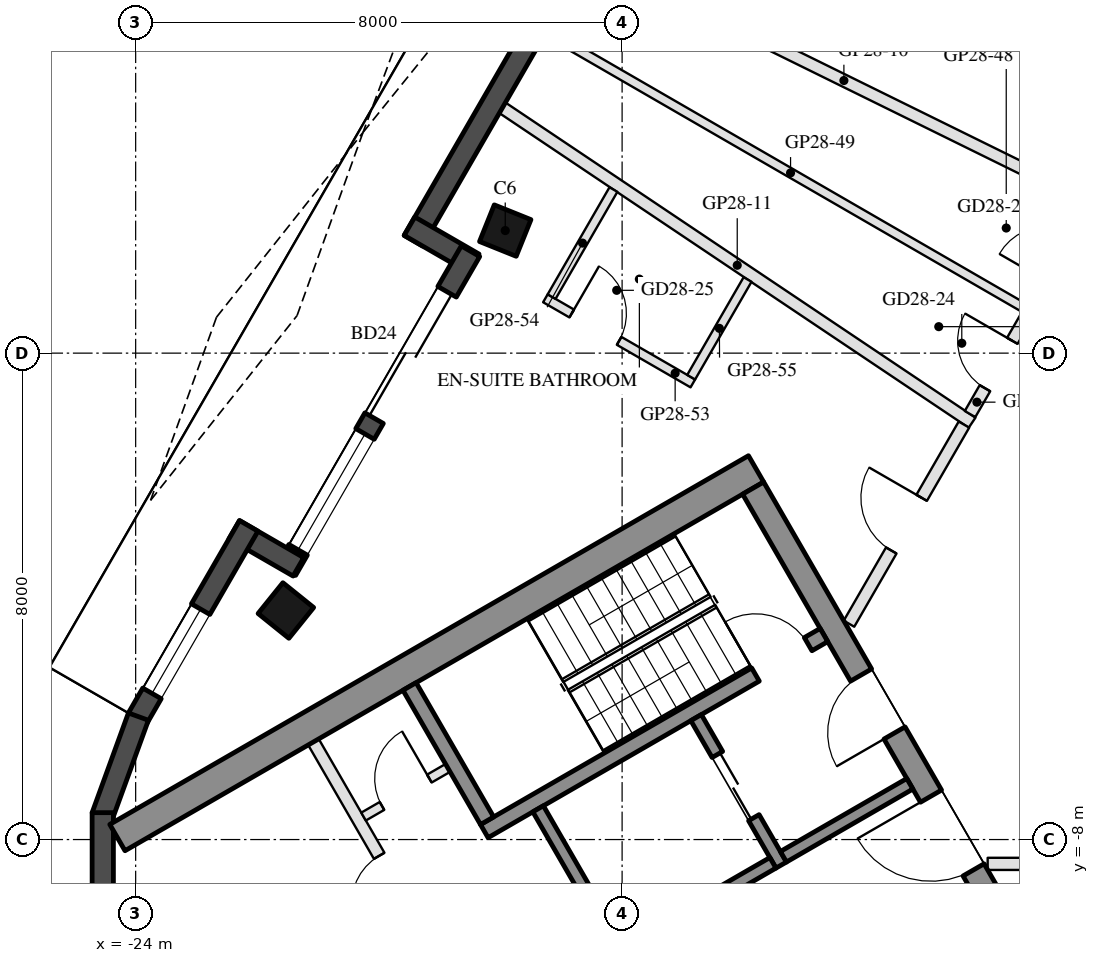
"""IFC4 building model, lengths in metres.
Left out: names, types, materials, properties, quantities, classifications, styles, units other than length and angle.
Written with IfcOpenShell. Run it as: python <this file> out.ifc"""

import sys

from ifc_helpers import new_model, si_unit, direction, frame, frame_2d, origin, origin_2d, place, context, subcontext, project, spatial, rectangle, hollow_rectangle, extrude, boolean, halfspace, element, fill, save


model = new_model("IFC4")
c1 = context("Model", 3, precision=1e-05, world=origin(), true_north=direction((0.0, 1.0)))
c2 = subcontext(c1, "Body", "Model", "MODEL_VIEW")
j1 = project(units=[si_unit("LENGTHUNIT", "METRE"), si_unit("PLANEANGLEUNIT", "RADIAN")], contexts=[c1])
p1 = place(None, origin())
s1 = spatial("IfcSite", under=j1, at=p1, CompositionType="ELEMENT")
p2 = place(p1, origin())
s2 = spatial("IfcBuilding", under=s1, at=p2, CompositionType="ELEMENT")
p3 = place(p2, frame((0.0, 0.0, 287.4)))
s3 = spatial("IfcBuildingStorey", under=s2, at=p3, CompositionType="ELEMENT", Elevation=287.4)
p4 = place(p3, frame((-17.922, 2.016, 0.0), z_axis=(0.161441555696, -0.022914285325, 0.986616216987), x_axis=(-0.49507293815, -0.866715878813, 0.060879974747)))
e1 = element("IfcColumn", 1, at=p4, inside=s3, PredefinedType="COLUMN", context=c2, shape_type="SweptSolid", body=[
    boolean("DIFFERENCE", boolean("DIFFERENCE", extrude(hollow_rectangle(XDim=0.65, YDim=0.65, WallThickness=0.03, at=origin_2d()), origin(), (0.0, 0.0, 1.0), 3.75), halfspace(frame((0.0, 0.0, 0.04), z_axis=(0.0, 0.0, 1.0), x_axis=(1.0, 0.0, 0.0)), True)), halfspace(frame((0.0, 0.0, 3.711), z_axis=(0.0, 0.0, 1.0), x_axis=(1.0, 0.0, 0.0)), False)),
])
p5 = place(p3, frame((-21.53, -4.233, 0.0), z_axis=(0.190723355538, 0.02965081359, 0.981195918716), x_axis=(-0.48832184533, -0.864229250401, 0.121035441609)))
e2 = element("IfcColumn", 2, at=p5, inside=s3, PredefinedType="COLUMN", context=c2, shape_type="SweptSolid", body=[
    boolean("DIFFERENCE", boolean("DIFFERENCE", extrude(hollow_rectangle(XDim=0.65, YDim=0.65, WallThickness=0.03, at=origin_2d()), origin(), (0.0, 0.0, 1.0), 3.771), halfspace(frame((0.0, 0.0, 0.047), z_axis=(0.0, 0.0, 1.0), x_axis=(1.0, 0.0, 0.0)), True)), halfspace(frame((0.0, 0.0, 3.724), z_axis=(0.0, 0.0, 1.0), x_axis=(1.0, 0.0, 0.0)), False)),
])
p6 = place(p3, frame((-14.925, 9.656, 0.0), z_axis=(0.0, 0.0, 1.0), x_axis=(-0.500018599098, -0.866014665324, 0.0)))
e3 = element("IfcWall", 3, at=p6, inside=s3, PredefinedType="SOLIDWALL", context=c2, shape_type="SweptSolid", body=[
    extrude(rectangle(XDim=9.015, YDim=0.35, at=frame_2d((4.508, 0.0))), origin(), (0.0, 0.0, 1.0), 3.55),
])
p7 = place(p6, frame((1.614, 0.0, 0.0)))
e4 = element("IfcOpeningElement", 4, at=p7, cuts=e3, PredefinedType="OPENING", context=c2, shape_type="SweptSolid", body=[
    extrude(rectangle(XDim=1.4, YDim=2.4, at=frame_2d((0.7, 1.2))), frame((0.0, 0.185, 0.0), z_axis=(0.0, -1.0, 0.0), x_axis=(1.0, 0.0, 0.0)), (0.0, 0.0, 1.0), 0.37),
])
p8 = place(p3, frame((-19.497, 2.088, 0.0), z_axis=(0.0, 0.0, 1.0), x_axis=(0.866005645448, -0.500034220881, 0.0)))
e5 = element("IfcWall", 5, at=p8, inside=s3, PredefinedType="SOLIDWALL", context=c2, shape_type="SweptSolid", body=[
    extrude(rectangle(XDim=1.22, YDim=0.35, at=frame_2d((0.61, 0.0))), origin(), (0.0, 0.0, 1.0), 3.55),
])
p9 = place(p3, frame((-18.493, 1.676, 0.0), z_axis=(0.0, 0.0, 1.0), x_axis=(-0.499985371027, -0.866033849661, 0.0)))
e6 = element("IfcWall", 6, at=p9, inside=s3, PredefinedType="SOLIDWALL", context=c2, shape_type="SweptSolid", body=[
    extrude(rectangle(XDim=6.055, YDim=0.35, at=frame_2d((3.028, 0.0))), origin(), (0.0, 0.0, 1.0), 3.55),
])
p10 = place(p9, frame((0.77, 0.0, 0.0)))
e7 = element("IfcOpeningElement", 7, at=p10, cuts=e6, PredefinedType="OPENING", context=c2, shape_type="SweptSolid", body=[
    extrude(rectangle(XDim=2.4, YDim=2.4, at=frame_2d((1.2, 1.2))), frame((0.0, 0.185, 0.0), z_axis=(0.0, -1.0, 0.0), x_axis=(1.0, 0.0, 0.0)), (0.0, 0.0, 1.0), 0.37),
])
p11 = place(p9, frame((3.47, 0.0, 0.3)))
e8 = element("IfcOpeningElement", 8, at=p11, cuts=e6, PredefinedType="OPENING", context=c2, shape_type="SweptSolid", body=[
    extrude(rectangle(XDim=2.2, YDim=2.65, at=frame_2d((1.1, 1.325))), frame((0.0, 0.185, 0.0), z_axis=(0.0, -1.0, 0.0), x_axis=(1.0, 0.0, 0.0)), (0.0, 0.0, 1.0), 0.37),
])
p12 = place(p3, frame((-21.323, -3.515, 0.0), z_axis=(0.0, 0.0, 1.0), x_axis=(-0.866092288191, 0.499884134912, 0.0)))
e9 = element("IfcWall", 9, at=p12, inside=s3, PredefinedType="SOLIDWALL", context=c2, shape_type="SweptSolid", body=[
    extrude(rectangle(XDim=1.22, YDim=0.35, at=frame_2d((0.61, 0.0))), origin(), (0.0, 0.0, 1.0), 3.55),
])
p13 = place(p3, frame((-22.14, -2.841, 0.0), z_axis=(0.0, 0.0, 1.0), x_axis=(-0.500040506767, -0.866002015928, 0.0)))
e10 = element("IfcWall", 10, at=p13, inside=s3, PredefinedType="SOLIDWALL", context=c2, shape_type="SweptSolid", body=[
    extrude(rectangle(XDim=3.655, YDim=0.35, at=frame_2d((1.827, 0.0))), origin(), (0.0, 0.0, 1.0), 3.55),
])
p14 = place(p13, frame((1.582, 0.0, 0.3)))
e11 = element("IfcOpeningElement", 11, at=p14, cuts=e10, PredefinedType="OPENING", context=c2, shape_type="SweptSolid", body=[
    extrude(rectangle(XDim=1.6, YDim=2.65, at=frame_2d((0.8, 1.325))), frame((0.0, 0.185, 0.0), z_axis=(0.0, -1.0, 0.0), x_axis=(1.0, 0.0, 0.0)), (0.0, 0.0, 1.0), 0.37),
])
for number, where, z_axis, x_axis in (
    (12, (-23.955, -5.978, 0.0), (0.0, 0.0, 1.0), (-0.342, -0.94, 0.0)),
    (13, (-24.541, -7.558, 0.0), (0.0, 0.0, 1.0), (0.0, -1.0, 0.0)),
):
    element("IfcWall", number, at=place(p3, frame(where, z_axis=z_axis, x_axis=x_axis)), inside=s3, PredefinedType="SOLIDWALL", context=c2, shape_type="SweptSolid", body=[
        extrude(rectangle(XDim=1.745, YDim=0.35, at=frame_2d((0.872, 0.0))), origin(), (0.0, 0.0, 1.0), 3.55),
    ])
p15 = place(p3, frame((-13.797, -1.903, 0.0), z_axis=(0.0, 0.0, 1.0), x_axis=(-0.866024688907, -0.500001238203, 0.0)))
e14 = element("IfcWall", 14, at=p15, inside=s3, PredefinedType="SHEAR", context=c2, shape_type="SweptSolid", body=[
    extrude(rectangle(XDim=12.129, YDim=0.5, at=frame_2d((6.064, 0.0))), origin(), (0.0, 0.0, 1.0), 3.5),
])
p16 = place(p3, frame((-13.845, -2.22, 0.0), z_axis=(0.0, 0.0, 1.0), x_axis=(0.500004234368, -0.866022959057, 0.0)))
e15 = element("IfcWall", 15, at=p16, inside=s3, PredefinedType="SHEAR", context=c2, shape_type="SweptSolid", body=[
    extrude(rectangle(XDim=10.0, YDim=0.4, at=frame_2d((5.0, 0.0))), origin(), (0.0, 0.0, 1.0), 3.5),
])
p17 = place(p16, frame((3.55, 0.0, 0.0)))
e16 = element("IfcOpeningElement", 16, at=p17, cuts=e15, PredefinedType="OPENING", context=c2, shape_type="SweptSolid", body=[
    extrude(rectangle(XDim=1.1, YDim=2.1, at=frame_2d((0.55, 1.05))), frame((0.0, 0.21, 0.0), z_axis=(0.0, -1.0, 0.0), x_axis=(1.0, 0.0, 0.0)), (0.0, 0.0, 1.0), 0.42),
])
p18 = place(p16, frame((5.85, 0.0, 0.0)))
e17 = element("IfcOpeningElement", 17, at=p18, cuts=e15, PredefinedType="OPENING", context=c2, shape_type="SweptSolid", body=[
    extrude(rectangle(XDim=1.4, YDim=2.1, at=frame_2d((0.7, 1.05))), frame((0.0, 0.21, 0.0), z_axis=(0.0, -1.0, 0.0), x_axis=(1.0, 0.0, 0.0)), (0.0, 0.0, 1.0), 0.42),
])
p19 = place(p3, frame((-12.681, -4.636, 0.0), z_axis=(0.0, 0.0, 1.0), x_axis=(-0.866021702275, -0.500006411147, 0.0)))
e18 = element("IfcWall", 18, at=p19, inside=s3, PredefinedType="SHEAR", context=c2, shape_type="SweptSolid", body=[
    extrude(rectangle(XDim=6.45, YDim=0.25, at=frame_2d((3.225, 0.0))), origin(), (0.0, 0.0, 1.0), 3.5),
])
p20 = place(p19, frame((0.3, 0.0, 0.0)))
e19 = element("IfcOpeningElement", 19, at=p20, cuts=e18, PredefinedType="OPENING", context=c2, shape_type="SweptSolid", body=[
    extrude(rectangle(XDim=1.0, YDim=2.1, at=frame_2d((0.5, 1.05))), frame((0.0, 0.135, 0.0), z_axis=(0.0, -1.0, 0.0), x_axis=(1.0, 0.0, 0.0)), (0.0, 0.0, 1.0), 0.27),
])
p21 = place(p3, frame((-19.496, -5.482, 0.0), z_axis=(0.0, 0.0, 1.0), x_axis=(0.499990435942, -0.866030925526, 0.0)))
e20 = element("IfcWall", 20, at=p21, inside=s3, PredefinedType="SHEAR", context=c2, shape_type="SweptSolid", body=[
    extrude(rectangle(XDim=2.55, YDim=0.25, at=frame_2d((1.275, 0.0))), origin(), (0.0, 0.0, 1.0), 3.5),
])
p22 = place(p3, frame((-17.381, -7.495, 0.0), z_axis=(0.0, 0.0, 1.0), x_axis=(0.500011755427, -0.866018616679, 0.0)))
e21 = element("IfcWall", 21, at=p22, inside=s3, PredefinedType="SHEAR", context=c2, shape_type="SweptSolid", body=[
    extrude(rectangle(XDim=2.8, YDim=0.2, at=frame_2d((1.4, 0.0))), origin(), (0.0, 0.0, 1.0), 3.5),
])
p23 = place(p3, frame((-14.783, -5.995, 0.0), z_axis=(0.0, 0.0, 1.0), x_axis=(0.49994636267, -0.866056369097, 0.0)))
e22 = element("IfcWall", 22, at=p23, inside=s3, PredefinedType="SHEAR", context=c2, shape_type="SweptSolid", body=[
    extrude(rectangle(XDim=2.8, YDim=0.2, at=frame_2d((1.4, 0.0))), origin(), (0.0, 0.0, 1.0), 3.5),
])
p24 = place(p23, frame((0.7, 0.0, 0.0)))
e23 = element("IfcOpeningElement", 23, at=p24, cuts=e22, PredefinedType="OPENING", context=c2, shape_type="SweptSolid", body=[
    extrude(rectangle(XDim=1.2, YDim=2.1, at=frame_2d((0.6, 1.05))), frame((0.0, 0.11, 0.0), z_axis=(0.0, -1.0, 0.0), x_axis=(1.0, 0.0, 0.0)), (0.0, 0.0, 1.0), 0.22),
])
p25 = place(p3, frame((-13.52, -8.383, 0.0), z_axis=(0.0, 0.0, 1.0), x_axis=(-0.866034573852, -0.49998411664, 0.0)))
e24 = element("IfcWall", 24, at=p25, inside=s3, PredefinedType="SHEAR", context=c2, shape_type="SweptSolid", body=[
    extrude(rectangle(XDim=2.8, YDim=0.2, at=frame_2d((1.4, 0.0))), origin(), (0.0, 0.0, 1.0), 3.5),
])
p26 = place(p3, frame((-11.268, -7.083, 0.0), z_axis=(0.0, 0.0, 1.0), x_axis=(-0.866050077142, -0.499957262057, 0.0)))
e25 = element("IfcWall", 25, at=p26, inside=s3, PredefinedType="SHEAR", context=c2, shape_type="SweptSolid", body=[
    extrude(rectangle(XDim=2.4, YDim=0.2, at=frame_2d((1.2, 0.0))), origin(), (0.0, 0.0, 1.0), 3.5),
])
p27 = place(p3, frame((-21.076, -6.395, 0.0), z_axis=(0.0, 0.0, 1.0), x_axis=(0.50001468107, -0.866016927499, 0.0)))
e26 = element("IfcWall", 26, at=p27, inside=s3, PredefinedType="PARTITIONING", context=c2, shape_type="SweptSolid", body=[
    extrude(rectangle(XDim=5.4, YDim=0.2, at=frame_2d((2.7, 0.0))), origin(), (0.0, 0.0, 1.0), 3.5),
])
p28 = place(p27, frame((2.163, 0.0, 0.0)))
e27 = element("IfcOpeningElement", 27, at=p28, cuts=e26, PredefinedType="OPENING", context=c2, shape_type="SweptSolid", body=[
    extrude(rectangle(XDim=0.9, YDim=2.1, at=frame_2d((0.45, 1.05))), frame((0.0, 0.11, 0.0), z_axis=(0.0, -1.0, 0.0), x_axis=(1.0, 0.0, 0.0)), (0.0, 0.0, 1.0), 0.22),
])
p29 = place(p27, frame((4.038, 0.0, 0.0)))
e28 = element("IfcOpeningElement", 28, at=p29, cuts=e26, PredefinedType="OPENING", context=c2, shape_type="SweptSolid", body=[
    extrude(rectangle(XDim=0.9, YDim=2.1, at=frame_2d((0.45, 1.05))), frame((0.0, 0.11, 0.0), z_axis=(0.0, -1.0, 0.0), x_axis=(1.0, 0.0, 0.0)), (0.0, 0.0, 1.0), 0.22),
])
p30 = place(p3, frame((-18.866, -6.822, 0.0), z_axis=(0.0, 0.0, 1.0), x_axis=(-0.866028054938, -0.499995408039, 0.0)))
e29 = element("IfcWall", 29, at=p30, inside=s3, PredefinedType="PARTITIONING", context=c2, shape_type="SweptSolid", body=[
    extrude(rectangle(XDim=1.6, YDim=0.15, at=frame_2d((0.8, 0.0))), origin(), (0.0, 0.0, 1.0), 3.5),
])
p31 = place(p30, frame((0.35, 0.0, 0.0)))
e30 = element("IfcOpeningElement", 30, at=p31, cuts=e29, PredefinedType="OPENING", context=c2, shape_type="SweptSolid", body=[
    extrude(rectangle(XDim=0.9, YDim=2.1, at=frame_2d((0.45, 1.05))), frame((0.0, 0.085, 0.0), z_axis=(0.0, -1.0, 0.0), x_axis=(1.0, 0.0, 0.0)), (0.0, 0.0, 1.0), 0.17),
])
p32 = place(p3, frame((-16.524, 6.538, 0.0), z_axis=(0.0, 0.0, 1.0), x_axis=(0.897120251728, -0.441786434762, 0.0)))
e31 = element("IfcWall", 31, at=p32, inside=s3, PredefinedType="PARTITIONING", context=c2, shape_type="SweptSolid", body=[
    extrude(rectangle(XDim=9.299, YDim=0.2, at=frame_2d((4.649, 0.0))), origin(), (0.0, 0.0, 1.0), 3.1),
])
p33 = place(p3, frame((-17.969, 4.035, 0.0), z_axis=(0.0, 0.0, 1.0), x_axis=(0.830560992963, -0.556927676604, 0.0)))
e32 = element("IfcWall", 32, at=p33, inside=s3, PredefinedType="PARTITIONING", context=c2, shape_type="SweptSolid", body=[
    extrude(rectangle(XDim=9.3, YDim=0.2, at=frame_2d((4.65, 0.0))), origin(), (0.0, 0.0, 1.0), 3.1),
])
p34 = place(p3, frame((-5.0, -8.4, 0.0), z_axis=(0.0, 0.0, 1.0), x_axis=(-1.0, 0.0, 0.0)))
e33 = element("IfcWall", 33, at=p34, inside=s3, PredefinedType="PARTITIONING", context=c2, shape_type="SweptSolid", body=[
    extrude(rectangle(XDim=4.988, YDim=0.2, at=frame_2d((2.494, 0.0))), origin(), (0.0, 0.0, 1.0), 3.05),
])
p35 = place(p34, frame((2.05, 0.0, 0.0)))
e34 = element("IfcOpeningElement", 34, at=p35, cuts=e33, PredefinedType="OPENING", context=c2, shape_type="SweptSolid", body=[
    extrude(rectangle(XDim=1.0, YDim=2.1, at=frame_2d((0.5, 1.05))), frame((0.0, 0.11, 0.0), z_axis=(0.0, -1.0, 0.0), x_axis=(1.0, 0.0, 0.0)), (0.0, 0.0, 1.0), 0.22),
])
p36 = place(p3, frame((-9.795, 5.634, 0.0), z_axis=(0.0, 0.0, 1.0), x_axis=(0.866034573852, -0.49998411664, 0.0)))
e35 = element("IfcWall", 35, at=p36, inside=s3, PredefinedType="PARTITIONING", context=c2, shape_type="SweptSolid", body=[
    extrude(rectangle(XDim=2.8, YDim=0.15, at=frame_2d((1.4, 0.0))), origin(), (0.0, 0.0, 1.0), 3.05),
])
p37 = place(p36, frame((0.5, 0.0, 0.0)))
e36 = element("IfcOpeningElement", 36, at=p37, cuts=e35, PredefinedType="OPENING", context=c2, shape_type="SweptSolid", body=[
    extrude(rectangle(XDim=0.9, YDim=2.1, at=frame_2d((0.45, 1.05))), frame((0.0, 0.085, 0.0), z_axis=(0.0, -1.0, 0.0), x_axis=(1.0, 0.0, 0.0)), (0.0, 0.0, 1.0), 0.17),
])
p38 = place(p3, frame((-17.246, 5.286, 0.0), z_axis=(0.0, 0.0, 1.0), x_axis=(0.865746766399, -0.500482303853, 0.0)))
e37 = element("IfcWall", 37, at=p38, inside=s3, PredefinedType="PARTITIONING", context=c2, shape_type="SweptSolid", body=[
    extrude(rectangle(XDim=9.279, YDim=0.15, at=frame_2d((4.639, 0.0))), origin(), (0.0, 0.0, 1.0), 3.1),
])
p39 = place(p3, frame((-10.278, -1.002, 0.0), z_axis=(0.0, 0.0, 1.0), x_axis=(0.499977061294, 0.866038647048, 0.0)))
e38 = element("IfcWall", 38, at=p39, inside=s3, PredefinedType="PARTITIONING", context=c2, shape_type="SweptSolid", body=[
    extrude(rectangle(XDim=1.881, YDim=0.2, at=frame_2d((0.941, 0.0))), origin(), (0.0, 0.0, 1.0), 3.55),
])
p40 = place(p39, frame((0.491, 0.0, 0.0)))
e39 = element("IfcOpeningElement", 39, at=p40, cuts=e38, PredefinedType="OPENING", context=c2, shape_type="SweptSolid", body=[
    extrude(rectangle(XDim=0.9, YDim=2.1, at=frame_2d((0.45, 1.05))), frame((0.0, 0.11, 0.0), z_axis=(0.0, -1.0, 0.0), x_axis=(1.0, 0.0, 0.0)), (0.0, 0.0, 1.0), 0.22),
])
p41 = place(p3, frame((-12.269, -4.45, 0.0), z_axis=(0.0, 0.0, 1.0), x_axis=(0.500000040646, 0.866025380318, 0.0)))
e40 = element("IfcWall", 40, at=p41, inside=s3, PredefinedType="PARTITIONING", context=c2, shape_type="SweptSolid", body=[
    extrude(rectangle(XDim=3.781, YDim=0.2, at=frame_2d((1.891, 0.0))), origin(), (0.0, 0.0, 1.0), 3.05),
])
p42 = place(p41, frame((1.391, 0.0, 0.0)))
e41 = element("IfcOpeningElement", 41, at=p42, cuts=e40, PredefinedType="OPENING", context=c2, shape_type="SweptSolid", body=[
    extrude(rectangle(XDim=1.0, YDim=2.1, at=frame_2d((0.5, 1.05))), frame((0.0, 0.11, 0.0), z_axis=(0.0, -1.0, 0.0), x_axis=(1.0, 0.0, 0.0)), (0.0, 0.0, 1.0), 0.22),
])
p43 = place(p3, frame((-17.262, 0.902, 0.0), z_axis=(0.0, 0.0, 1.0), x_axis=(0.866034573852, -0.49998411664, 0.0)))
e42 = element("IfcWall", 42, at=p43, inside=s3, PredefinedType="PARTITIONING", context=c2, shape_type="SweptSolid", body=[
    extrude(rectangle(XDim=2.8, YDim=0.15, at=frame_2d((1.4, 0.0))), origin(), (0.0, 0.0, 1.0), 3.1),
])
p44 = place(p43, frame((0.5, 0.0, 0.0)))
e43 = element("IfcOpeningElement", 43, at=p44, cuts=e42, PredefinedType="OPENING", context=c2, shape_type="SweptSolid", body=[
    extrude(rectangle(XDim=0.9, YDim=2.1, at=frame_2d((0.45, 1.05))), frame((0.0, 0.085, 0.0), z_axis=(0.0, -1.0, 0.0), x_axis=(1.0, 0.0, 0.0)), (0.0, 0.0, 1.0), 0.17),
])
p45 = place(p3, frame((-16.143, 2.69, 0.0), z_axis=(0.0, 0.0, 1.0), x_axis=(-0.500013496215, -0.866017611601, 0.0)))
e44 = element("IfcWall", 44, at=p45, inside=s3, PredefinedType="PARTITIONING", context=c2, shape_type="SweptSolid", body=[
    extrude(rectangle(XDim=2.033, YDim=0.15, at=frame_2d((1.017, 0.0))), origin(), (0.0, 0.0, 1.0), 3.05),
])
p46 = place(p3, frame((-13.937, 1.211, 0.0), z_axis=(0.0, 0.0, 1.0), x_axis=(-0.500003477455, -0.866023396066, 0.0)))
e45 = element("IfcWall", 45, at=p46, inside=s3, PredefinedType="PARTITIONING", context=c2, shape_type="SweptSolid", body=[
    extrude(rectangle(XDim=1.855, YDim=0.15, at=frame_2d((0.927, 0.0))), origin(), (0.0, 0.0, 1.0), 3.05),
])
p47 = place(p10, frame((2.4, 0.0, 0.0), z_axis=(0.0, 0.0, 1.0), x_axis=(-1.0, 0.0, 0.0)))
e46 = element("IfcDoor", 46, at=p47, inside=s3, OperationType="SLIDING_TO_LEFT", PredefinedType="DOOR", context=c2, shape_type="SweptSolid", body=[
    extrude(rectangle(XDim=2.4, YDim=2.4, at=frame_2d((1.2, 1.2))), frame((0.0, 0.025, 0.0), z_axis=(0.0, -1.0, 0.0), x_axis=(1.0, 0.0, 0.0)), (0.0, 0.0, 1.0), 0.05),
])
fill(e7, e46)
p48 = place(p11, origin())
e47 = element("IfcWindow", 47, at=p48, inside=s3, PartitioningType="SINGLE_PANEL", PredefinedType="WINDOW", context=c2, shape_type="SweptSolid", body=[
    extrude(rectangle(XDim=2.2, YDim=2.65, at=frame_2d((1.1, 1.325))), frame((0.0, 0.03, 0.0), z_axis=(0.0, -1.0, 0.0), x_axis=(1.0, 0.0, 0.0)), (0.0, 0.0, 1.0), 0.06),
])
fill(e8, e47)
p49 = place(p14, origin())
e48 = element("IfcWindow", 48, at=p49, inside=s3, PartitioningType="SINGLE_PANEL", PredefinedType="WINDOW", context=c2, shape_type="SweptSolid", body=[
    extrude(rectangle(XDim=1.6, YDim=2.65, at=frame_2d((0.8, 1.325))), frame((0.0, 0.03, 0.0), z_axis=(0.0, -1.0, 0.0), x_axis=(1.0, 0.0, 0.0)), (0.0, 0.0, 1.0), 0.06),
])
fill(e11, e48)
p50 = place(p24, origin())
e49 = element("IfcDoor", 49, at=p50, inside=s3, OperationType="DOUBLE_DOOR_SLIDING", PredefinedType="DOOR", context=c2, shape_type="SweptSolid", body=[
    extrude(rectangle(XDim=1.2, YDim=2.1, at=frame_2d((0.6, 1.05))), frame((0.0, 0.025, 0.0), z_axis=(0.0, -1.0, 0.0), x_axis=(1.0, 0.0, 0.0)), (0.0, 0.0, 1.0), 0.05),
])
fill(e23, e49)
p51 = place(p31, frame((0.9, 0.0, 0.0), z_axis=(0.0, 0.0, 1.0), x_axis=(-1.0, 0.0, 0.0)))
e50 = element("IfcDoor", 50, at=p51, inside=s3, OperationType="SINGLE_SWING_RIGHT", PredefinedType="DOOR", context=c2, shape_type="SweptSolid", body=[
    extrude(rectangle(XDim=0.9, YDim=2.1, at=frame_2d((0.45, 1.05))), frame((0.0, 0.025, 0.0), z_axis=(0.0, -1.0, 0.0), x_axis=(1.0, 0.0, 0.0)), (0.0, 0.0, 1.0), 0.05),
])
fill(e30, e50)
p52 = place(p28, frame((0.9, 0.0, 0.0), z_axis=(0.0, 0.0, 1.0), x_axis=(-1.0, 0.0, 0.0)))
e51 = element("IfcDoor", 51, at=p52, inside=s3, OperationType="SINGLE_SWING_LEFT", PredefinedType="DOOR", context=c2, shape_type="SweptSolid", body=[
    extrude(rectangle(XDim=0.9, YDim=2.1, at=frame_2d((0.45, 1.05))), frame((0.0, 0.025, 0.0), z_axis=(0.0, -1.0, 0.0), x_axis=(1.0, 0.0, 0.0)), (0.0, 0.0, 1.0), 0.05),
])
fill(e27, e51)
p53 = place(p17, frame((1.1, 0.0, 0.0), z_axis=(0.0, 0.0, 1.0), x_axis=(-1.0, 0.0, 0.0)))
e52 = element("IfcDoor", 52, at=p53, inside=s3, OperationType="SINGLE_SWING_LEFT", PredefinedType="DOOR", context=c2, shape_type="SweptSolid", body=[
    extrude(rectangle(XDim=1.1, YDim=2.1, at=frame_2d((0.55, 1.05))), frame((0.0, 0.025, 0.0), z_axis=(0.0, -1.0, 0.0), x_axis=(1.0, 0.0, 0.0)), (0.0, 0.0, 1.0), 0.05),
])
fill(e16, e52)
p54 = place(p18, frame((1.4, 0.0, 0.0), z_axis=(0.0, 0.0, 1.0), x_axis=(-1.0, 0.0, 0.0)))
e53 = element("IfcDoor", 53, at=p54, inside=s3, OperationType="DOUBLE_DOOR_SINGLE_SWING", PredefinedType="DOOR", context=c2, shape_type="SweptSolid", body=[
    extrude(rectangle(XDim=1.4, YDim=2.1, at=frame_2d((0.7, 1.05))), frame((0.0, 0.025, 0.0), z_axis=(0.0, -1.0, 0.0), x_axis=(1.0, 0.0, 0.0)), (0.0, 0.0, 1.0), 0.05),
])
fill(e17, e53)
p55 = place(p20, frame((1.0, 0.0, 0.0), z_axis=(0.0, 0.0, 1.0), x_axis=(-1.0, 0.0, 0.0)))
e54 = element("IfcDoor", 54, at=p55, inside=s3, OperationType="SINGLE_SWING_LEFT", PredefinedType="DOOR", context=c2, shape_type="SweptSolid", body=[
    extrude(rectangle(XDim=1.0, YDim=2.1, at=frame_2d((0.5, 1.05))), frame((0.0, 0.025, 0.0), z_axis=(0.0, -1.0, 0.0), x_axis=(1.0, 0.0, 0.0)), (0.0, 0.0, 1.0), 0.05),
])
fill(e19, e54)
p56 = place(p40, origin())
e55 = element("IfcDoor", 55, at=p56, inside=s3, OperationType="SINGLE_SWING_RIGHT", PredefinedType="DOOR", context=c2, shape_type="SweptSolid", body=[
    extrude(rectangle(XDim=0.9, YDim=2.1, at=frame_2d((0.45, 1.05))), frame((0.0, 0.025, 0.0), z_axis=(0.0, -1.0, 0.0), x_axis=(1.0, 0.0, 0.0)), (0.0, 0.0, 1.0), 0.05),
])
fill(e39, e55)
p57 = place(p44, origin())
e56 = element("IfcDoor", 56, at=p57, inside=s3, OperationType="SINGLE_SWING_LEFT", PredefinedType="DOOR", context=c2, shape_type="SweptSolid", body=[
    extrude(rectangle(XDim=0.9, YDim=2.1, at=frame_2d((0.45, 1.05))), frame((0.0, 0.025, 0.0), z_axis=(0.0, -1.0, 0.0), x_axis=(1.0, 0.0, 0.0)), (0.0, 0.0, 1.0), 0.05),
])
fill(e43, e56)
p58 = place(p42, origin())
e57 = element("IfcDoor", 57, at=p58, inside=s3, OperationType="SINGLE_SWING_RIGHT", PredefinedType="DOOR", context=c2, shape_type="SweptSolid", body=[
    extrude(rectangle(XDim=1.0, YDim=2.1, at=frame_2d((0.5, 1.05))), frame((0.0, 0.025, 0.0), z_axis=(0.0, -1.0, 0.0), x_axis=(1.0, 0.0, 0.0)), (0.0, 0.0, 1.0), 0.05),
])
fill(e41, e57)
save(model, sys.argv[1])
